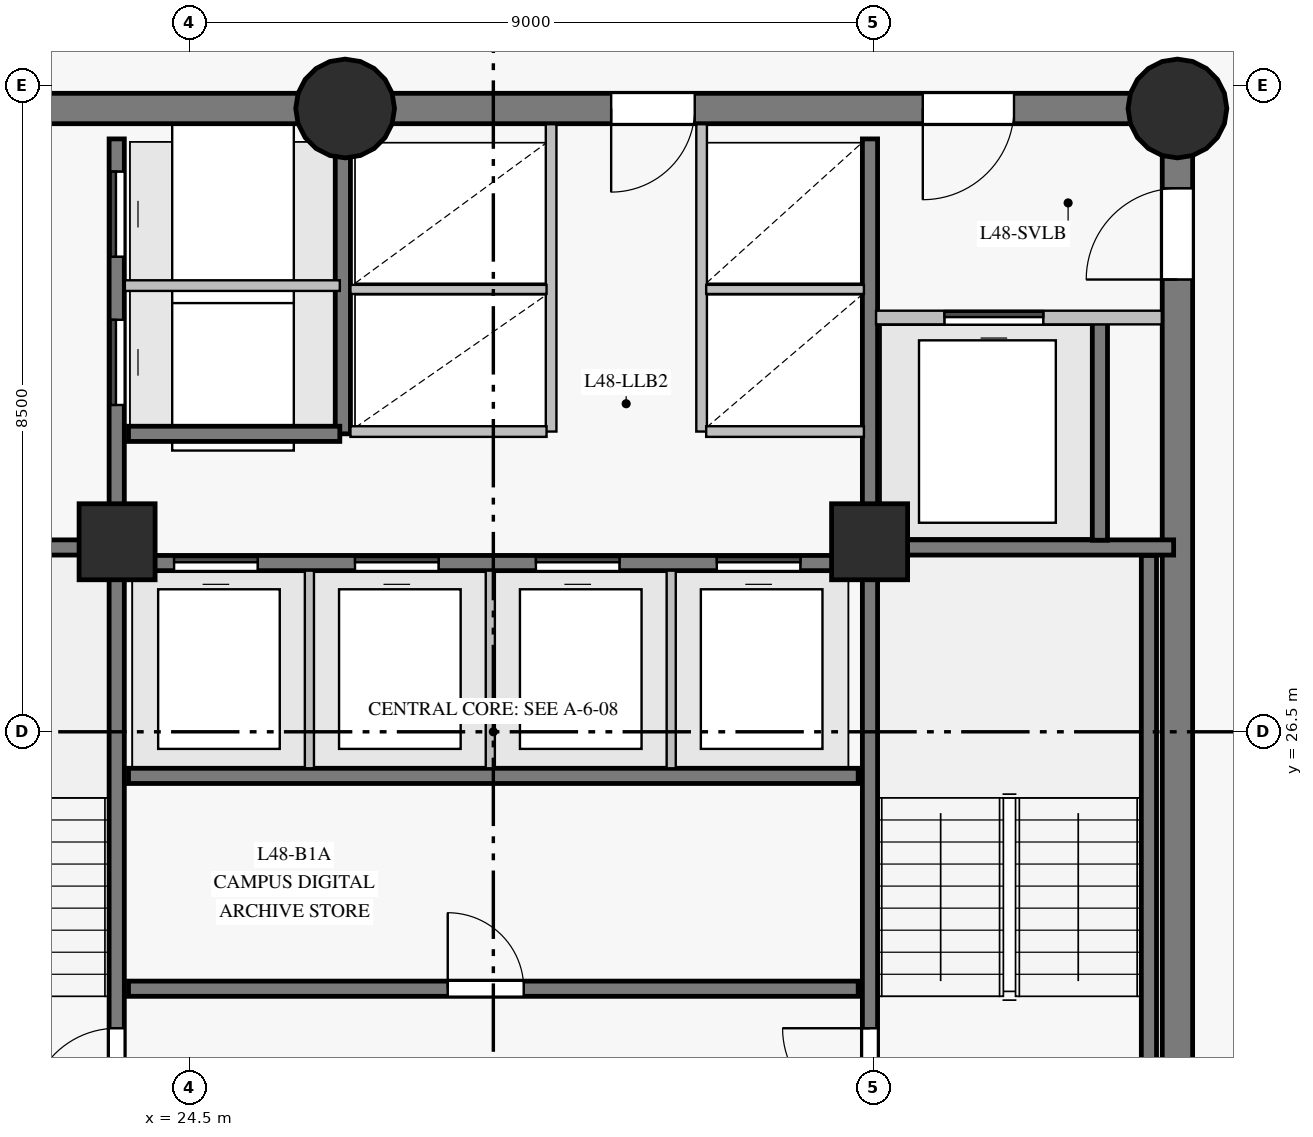
"""IFC4 building model, lengths in metres.
Left out: names, types, materials, properties, quantities, classifications, styles, units other than length and angle.
Written with IfcOpenShell. Run it as: python <this file> out.ifc"""

import sys

from ifc_helpers import new_model, si_unit, direction, frame, frame_2d, origin, origin_with_axes, origin_2d, place, context, subcontext, project, spatial, rectangle, circle, extrude, source, transform, mapped, element, fill, save


model = new_model("IFC4")
c1 = context("Model", 3, precision=1e-05, world=origin(), true_north=direction((0.0, 1.0)))
c2 = subcontext(c1, "Body", "Model", "MODEL_VIEW")
j1 = project(units=[si_unit("LENGTHUNIT", "METRE"), si_unit("PLANEANGLEUNIT", "RADIAN")], contexts=[c1])
p1 = place(None, origin())
s1 = spatial("IfcSite", under=j1, at=p1, CompositionType="ELEMENT")
p2 = place(p1, origin())
s2 = spatial("IfcBuilding", under=s1, at=p2, CompositionType="ELEMENT")
p3 = place(p2, frame((0.0, 0.0, 168.75)))
s3 = spatial("IfcBuildingStorey", under=s2, at=p3, CompositionType="ELEMENT", Elevation=168.75)
p4 = place(p3, frame((37.5, 18.3, 0.0), z_axis=(0.0, 0.0, 1.0), x_axis=(0.0, 1.0, 0.0)))
e1 = element("IfcWall", 1, at=p4, inside=s3, PredefinedType="SHEAR", context=c2, shape_type="SweptSolid", body=[
    extrude(rectangle(XDim=16.4, YDim=0.4, at=frame_2d((8.2, 0.0))), origin(), (0.0, 0.0, 1.0), 2.825),
])
p5 = place(p4, frame((14.15, 0.0, 0.0)))
e2 = element("IfcOpeningElement", 2, at=p5, cuts=e1, PredefinedType="OPENING", context=c2, shape_type="SweptSolid", body=[
    extrude(rectangle(XDim=1.2, YDim=2.15, at=frame_2d((0.6, 1.075))), frame((0.0, 0.21, 0.0), z_axis=(0.0, -1.0, 0.0), x_axis=(1.0, 0.0, 0.0)), (0.0, 0.0, 1.0), 0.42),
])
p6 = place(p3, frame((37.5, 34.7, 0.0), z_axis=(0.0, 0.0, 1.0), x_axis=(-1.0, 0.0, 0.0)))
e3 = element("IfcWall", 3, at=p6, inside=s3, PredefinedType="SHEAR", context=c2, shape_type="SweptSolid", body=[
    extrude(rectangle(XDim=10.95, YDim=0.4, at=frame_2d((5.475, 0.0))), origin(), (0.0, 0.0, 1.0), 2.825),
])
p7 = place(p6, frame((2.15, 0.0, 0.0)))
e4 = element("IfcOpeningElement", 4, at=p7, cuts=e3, PredefinedType="OPENING", context=c2, shape_type="SweptSolid", body=[
    extrude(rectangle(XDim=1.2, YDim=2.15, at=frame_2d((0.6, 1.075))), frame((0.0, 0.21, 0.0), z_axis=(0.0, -1.0, 0.0), x_axis=(1.0, 0.0, 0.0)), (0.0, 0.0, 1.0), 0.42),
])
p8 = place(p6, frame((6.35, 0.0, 0.0)))
e5 = element("IfcOpeningElement", 5, at=p8, cuts=e3, PredefinedType="OPENING", context=c2, shape_type="SweptSolid", body=[
    extrude(rectangle(XDim=1.1, YDim=2.15, at=frame_2d((0.55, 1.075))), frame((0.0, 0.21, 0.0), z_axis=(0.0, -1.0, 0.0), x_axis=(1.0, 0.0, 0.0)), (0.0, 0.0, 1.0), 0.42),
])
p9 = place(p3, frame((26.55, 34.7, 0.0), z_axis=(0.0, 0.0, 1.0), x_axis=(-1.0, 0.0, 0.0)))
e6 = element("IfcWall", 6, at=p9, inside=s3, PredefinedType="SHEAR", context=c2, shape_type="SweptSolid", body=[
    extrude(rectangle(XDim=7.05, YDim=0.4, at=frame_2d((3.525, 0.0))), origin(), (0.0, 0.0, 1.0), 2.825),
])
p10 = place(p9, frame((4.25, 0.0, 0.0)))
e7 = element("IfcOpeningElement", 7, at=p10, cuts=e6, PredefinedType="OPENING", context=c2, shape_type="SweptSolid", body=[
    extrude(rectangle(XDim=1.1, YDim=2.15, at=frame_2d((0.55, 1.075))), frame((0.0, 0.21, 0.0), z_axis=(0.0, -1.0, 0.0), x_axis=(1.0, 0.0, 0.0)), (0.0, 0.0, 1.0), 0.42),
])
m1 = source(origin_with_axes(), c2, "Body", "SweptSolid", [
    extrude(circle(Radius=0.65, at=origin_2d()), origin(), (0.0, 0.0, 1.0), 3.05),
])
for number, where, z_axis, x_axis in (
    (8, (26.55, 34.7, 0.0), (0.0, 0.0, 1.0), (1.0, 0.0, 0.0)),
    (9, (37.5, 34.7, 0.0), (0.0, 0.0, 1.0), (1.0, 0.0, 0.0)),
):
    element("IfcColumn", number, at=place(p3, frame(where, z_axis=z_axis, x_axis=x_axis)), inside=s3, PredefinedType="COLUMN", context=c2, shape_type="MappedRepresentation", body=[
        mapped(m1, transform((0.0, 0.0, 0.0), scale=1.0)),
    ])
m2 = source(origin_with_axes(), c2, "Body", "SweptSolid", [
    extrude(rectangle(XDim=1.0, YDim=1.0, at=origin_2d()), origin(), (0.0, 0.0, 1.0), 3.05),
])
for number, where, z_axis, x_axis in (
    (10, (23.55, 29.0, 0.0), (0.0, 0.0, 1.0), (1.0, 0.0, 0.0)),
    (11, (33.45, 29.0, 0.0), (0.0, 0.0, 1.0), (1.0, 0.0, 0.0)),
):
    element("IfcColumn", number, at=place(p3, frame(where, z_axis=z_axis, x_axis=x_axis)), inside=s3, PredefinedType="COLUMN", context=c2, shape_type="MappedRepresentation", body=[
        mapped(m2, transform((0.0, 0.0, 0.0), scale=1.0)),
    ])
p11 = place(p3, frame((23.545, 18.7, 0.0), z_axis=(0.0, 0.0, 1.0), x_axis=(0.0, 1.0, 0.0)))
e12 = element("IfcWall", 12, at=p11, inside=s3, PredefinedType="SHEAR", context=c2, shape_type="SweptSolid", body=[
    extrude(rectangle(XDim=15.6, YDim=0.2, at=frame_2d((7.8, 0.0))), origin(), (0.0, 0.0, 1.0), 2.825),
])
p12 = place(p11, frame((2.75, 0.0, 0.0)))
e13 = element("IfcOpeningElement", 13, at=p12, cuts=e12, PredefinedType="OPENING", context=c2, shape_type="SweptSolid", body=[
    extrude(rectangle(XDim=1.15, YDim=2.15, at=frame_2d((0.575, 1.075))), frame((0.0, 0.11, 0.0), z_axis=(0.0, -1.0, 0.0), x_axis=(1.0, 0.0, 0.0)), (0.0, 0.0, 1.0), 0.22),
])
p13 = place(p11, frame((0.14, 0.0, 0.0)))
e14 = element("IfcOpeningElement", 14, at=p13, cuts=e12, PredefinedType="OPENING", context=c2, shape_type="SweptSolid", body=[
    extrude(rectangle(XDim=0.88, YDim=2.1, at=frame_2d((0.44, 1.05))), frame((0.0, 0.11, 0.0), z_axis=(0.0, -1.0, 0.0), x_axis=(1.0, 0.0, 0.0)), (0.0, 0.0, 1.0), 0.22),
])
p14 = place(p11, frame((1.36, 0.0, 0.0)))
e15 = element("IfcOpeningElement", 15, at=p14, cuts=e12, PredefinedType="OPENING", context=c2, shape_type="SweptSolid", body=[
    extrude(rectangle(XDim=0.88, YDim=2.1, at=frame_2d((0.44, 1.05))), frame((0.0, 0.11, 0.0), z_axis=(0.0, -1.0, 0.0), x_axis=(1.0, 0.0, 0.0)), (0.0, 0.0, 1.0), 0.22),
])
p15 = place(p11, frame((12.1, 0.0, 0.0)))
e16 = element("IfcOpeningElement", 16, at=p15, cuts=e12, PredefinedType="OPENING", context=c2, shape_type="SweptSolid", body=[
    extrude(rectangle(XDim=1.12, YDim=2.15, at=frame_2d((0.56, 1.075))), frame((0.0, 0.11, 0.0), z_axis=(0.0, -1.0, 0.0), x_axis=(1.0, 0.0, 0.0)), (0.0, 0.0, 1.0), 0.22),
])
p16 = place(p11, frame((14.05, 0.0, 0.0)))
e17 = element("IfcOpeningElement", 17, at=p16, cuts=e12, PredefinedType="OPENING", context=c2, shape_type="SweptSolid", body=[
    extrude(rectangle(XDim=1.12, YDim=2.15, at=frame_2d((0.56, 1.075))), frame((0.0, 0.11, 0.0), z_axis=(0.0, -1.0, 0.0), x_axis=(1.0, 0.0, 0.0)), (0.0, 0.0, 1.0), 0.22),
])
p17 = place(p3, frame((33.455, 18.7, 0.0), z_axis=(0.0, 0.0, 1.0), x_axis=(0.0, 1.0, 0.0)))
e18 = element("IfcWall", 18, at=p17, inside=s3, PredefinedType="SHEAR", context=c2, shape_type="SweptSolid", body=[
    extrude(rectangle(XDim=15.6, YDim=0.2, at=frame_2d((7.8, 0.0))), origin(), (0.0, 0.0, 1.0), 2.825),
])
p18 = place(p17, frame((2.75, 0.0, 0.0)))
e19 = element("IfcOpeningElement", 19, at=p18, cuts=e18, PredefinedType="OPENING", context=c2, shape_type="SweptSolid", body=[
    extrude(rectangle(XDim=1.15, YDim=2.15, at=frame_2d((0.575, 1.075))), frame((0.0, 0.11, 0.0), z_axis=(0.0, -1.0, 0.0), x_axis=(1.0, 0.0, 0.0)), (0.0, 0.0, 1.0), 0.22),
])
p19 = place(p17, frame((0.55, 0.0, 0.0)))
e20 = element("IfcOpeningElement", 20, at=p19, cuts=e18, PredefinedType="OPENING", context=c2, shape_type="SweptSolid", body=[
    extrude(rectangle(XDim=0.94, YDim=2.1, at=frame_2d((0.47, 1.05))), frame((0.0, 0.11, 0.0), z_axis=(0.0, -1.0, 0.0), x_axis=(1.0, 0.0, 0.0)), (0.0, 0.0, 1.0), 0.22),
])
p20 = place(p3, frame((23.7, 23.12, 0.0), z_axis=(0.0, 0.0, 1.0), x_axis=(1.0, 0.0, 0.0)))
e21 = element("IfcWall", 21, at=p20, inside=s3, PredefinedType="SHEAR", context=c2, shape_type="SweptSolid", body=[
    extrude(rectangle(XDim=9.6, YDim=0.2, at=frame_2d((4.8, 0.0))), origin(), (0.0, 0.0, 1.0), 2.825),
])
p21 = place(p20, frame((4.2, 0.0, 0.0)))
e22 = element("IfcOpeningElement", 22, at=p21, cuts=e21, PredefinedType="OPENING", context=c2, shape_type="SweptSolid", body=[
    extrude(rectangle(XDim=1.0, YDim=2.15, at=frame_2d((0.5, 1.075))), frame((0.0, 0.11, 0.0), z_axis=(0.0, -1.0, 0.0), x_axis=(1.0, 0.0, 0.0)), (0.0, 0.0, 1.0), 0.22),
])
p22 = place(p3, frame((23.7, 25.92, 0.0), z_axis=(0.0, 0.0, 1.0), x_axis=(1.0, 0.0, 0.0)))
e23 = element("IfcWall", 23, at=p22, inside=s3, PredefinedType="SHEAR", context=c2, shape_type="SweptSolid", body=[
    extrude(rectangle(XDim=9.6, YDim=0.2, at=frame_2d((4.8, 0.0))), origin(), (0.0, 0.0, 1.0), 2.825),
])
p23 = place(p3, frame((23.7, 28.72, 0.0), z_axis=(0.0, 0.0, 1.0), x_axis=(1.0, 0.0, 0.0)))
e24 = element("IfcWall", 24, at=p23, inside=s3, PredefinedType="SHEAR", context=c2, shape_type="SweptSolid", body=[
    extrude(rectangle(XDim=9.6, YDim=0.2, at=frame_2d((4.8, 0.0))), origin(), (0.0, 0.0, 1.0), 2.825),
])
p24 = place(p23, frame((0.6, 0.0, 0.0)))
e25 = element("IfcOpeningElement", 25, at=p24, cuts=e24, PredefinedType="OPENING", context=c2, shape_type="SweptSolid", body=[
    extrude(rectangle(XDim=1.1, YDim=2.15, at=frame_2d((0.55, 1.075))), frame((0.0, 0.11, 0.0), z_axis=(0.0, -1.0, 0.0), x_axis=(1.0, 0.0, 0.0)), (0.0, 0.0, 1.0), 0.22),
])
p25 = place(p23, frame((2.98, 0.0, 0.0)))
e26 = element("IfcOpeningElement", 26, at=p25, cuts=e24, PredefinedType="OPENING", context=c2, shape_type="SweptSolid", body=[
    extrude(rectangle(XDim=1.1, YDim=2.15, at=frame_2d((0.55, 1.075))), frame((0.0, 0.11, 0.0), z_axis=(0.0, -1.0, 0.0), x_axis=(1.0, 0.0, 0.0)), (0.0, 0.0, 1.0), 0.22),
])
p26 = place(p23, frame((5.36, 0.0, 0.0)))
e27 = element("IfcOpeningElement", 27, at=p26, cuts=e24, PredefinedType="OPENING", context=c2, shape_type="SweptSolid", body=[
    extrude(rectangle(XDim=1.1, YDim=2.15, at=frame_2d((0.55, 1.075))), frame((0.0, 0.11, 0.0), z_axis=(0.0, -1.0, 0.0), x_axis=(1.0, 0.0, 0.0)), (0.0, 0.0, 1.0), 0.22),
])
p27 = place(p23, frame((7.74, 0.0, 0.0)))
e28 = element("IfcOpeningElement", 28, at=p27, cuts=e24, PredefinedType="OPENING", context=c2, shape_type="SweptSolid", body=[
    extrude(rectangle(XDim=1.1, YDim=2.15, at=frame_2d((0.55, 1.075))), frame((0.0, 0.11, 0.0), z_axis=(0.0, -1.0, 0.0), x_axis=(1.0, 0.0, 0.0)), (0.0, 0.0, 1.0), 0.22),
])
p28 = place(p3, frame((37.125, 21.32, 0.0), z_axis=(0.0, 0.0, 1.0), x_axis=(0.0, 1.0, 0.0)))
e29 = element("IfcWall", 29, at=p28, inside=s3, PredefinedType="SHEAR", context=c2, shape_type="SweptSolid", body=[
    extrude(rectangle(XDim=7.5, YDim=0.2, at=frame_2d((3.75, 0.0))), origin(), (0.0, 0.0, 1.0), 2.825),
])
for number, where, z_axis, x_axis in (
    (30, (33.455, 28.925, 0.0), (0.0, 0.0, 1.0), (1.0, 0.0, 0.0)),
    (31, (19.55, 28.925, 0.0), (0.0, 0.0, 1.0), (1.0, 0.0, 0.0)),
):
    element("IfcWall", number, at=place(p3, frame(where, z_axis=z_axis, x_axis=x_axis)), inside=s3, PredefinedType="SHEAR", context=c2, shape_type="SweptSolid", body=[
        extrude(rectangle(XDim=3.995, YDim=0.2, at=frame_2d((1.998, 0.0))), origin(), (0.0, 0.0, 1.0), 2.825),
    ])
p29 = place(p3, frame((26.52, 30.42, 0.0), z_axis=(0.0, 0.0, 1.0), x_axis=(0.0, 1.0, 0.0)))
e32 = element("IfcWall", 32, at=p29, inside=s3, PredefinedType="SHEAR", context=c2, shape_type="SweptSolid", body=[
    extrude(rectangle(XDim=3.86, YDim=0.2, at=frame_2d((1.93, 0.0))), origin(), (0.0, 0.0, 1.0), 2.825),
])
p30 = place(p3, frame((36.48, 29.02, 0.0), z_axis=(0.0, 0.0, 1.0), x_axis=(0.0, 1.0, 0.0)))
e33 = element("IfcWall", 33, at=p30, inside=s3, PredefinedType="SHEAR", context=c2, shape_type="SweptSolid", body=[
    extrude(rectangle(XDim=2.86, YDim=0.2, at=frame_2d((1.43, 0.0))), origin(), (0.0, 0.0, 1.0), 2.825),
])
p31 = place(p3, frame((23.7, 30.42, 0.0), z_axis=(0.0, 0.0, 1.0), x_axis=(1.0, 0.0, 0.0)))
e34 = element("IfcWall", 34, at=p31, inside=s3, PredefinedType="SHEAR", context=c2, shape_type="SweptSolid", body=[
    extrude(rectangle(XDim=2.78, YDim=0.2, at=frame_2d((1.39, 0.0))), origin(), (0.0, 0.0, 1.0), 2.825),
])
for number, where, z_axis, x_axis in (
    (35, (29.26, 30.45, 0.0), (0.0, 0.0, 1.0), (0.0, 1.0, 0.0)),
    (36, (31.24, 30.45, 0.0), (0.0, 0.0, 1.0), (0.0, 1.0, 0.0)),
):
    element("IfcWall", number, at=place(p3, frame(where, z_axis=z_axis, x_axis=x_axis)), inside=s3, PredefinedType="PARTITIONING", context=c2, shape_type="SweptSolid", body=[
        extrude(rectangle(XDim=4.043, YDim=0.14, at=frame_2d((2.021, 0.0))), origin(), (0.0, 0.0, 1.0), 2.825),
    ])
p32 = place(p3, frame((33.535, 31.95, 0.0), z_axis=(0.0, 0.0, 1.0), x_axis=(1.0, 0.0, 0.0)))
e37 = element("IfcWall", 37, at=p32, inside=s3, PredefinedType="PARTITIONING", context=c2, shape_type="SweptSolid", body=[
    extrude(rectangle(XDim=3.759, YDim=0.18, at=frame_2d((1.879, 0.0))), origin(), (0.0, 0.0, 1.0), 2.825),
])
p33 = place(p32, frame((0.9, 0.0, 0.0)))
e38 = element("IfcOpeningElement", 38, at=p33, cuts=e37, PredefinedType="OPENING", context=c2, shape_type="SweptSolid", body=[
    extrude(rectangle(XDim=1.3, YDim=2.2, at=frame_2d((0.65, 1.1))), frame((0.0, 0.1, 0.0), z_axis=(0.0, -1.0, 0.0), x_axis=(1.0, 0.0, 0.0)), (0.0, 0.0, 1.0), 0.2),
])
p34 = place(p3, frame((23.652, 32.37, 0.0), z_axis=(0.0, 0.0, 1.0), x_axis=(1.0, 0.0, 0.0)))
e39 = element("IfcWall", 39, at=p34, inside=s3, PredefinedType="PARTITIONING", context=c2, shape_type="SweptSolid", body=[
    extrude(rectangle(XDim=2.828, YDim=0.14, at=frame_2d((1.414, 0.0))), origin(), (0.0, 0.0, 1.0), 2.825),
])
for number, where, z_axis, x_axis in (
    (40, (26.08, 26.02, 0.0), (0.0, 0.0, 1.0), (0.0, 1.0, 0.0)),
    (41, (28.46, 26.02, 0.0), (0.0, 0.0, 1.0), (0.0, 1.0, 0.0)),
    (42, (30.84, 26.02, 0.0), (0.0, 0.0, 1.0), (0.0, 1.0, 0.0)),
):
    element("IfcWall", number, at=place(p3, frame(where, z_axis=z_axis, x_axis=x_axis)), inside=s3, PredefinedType="PARTITIONING", context=c2, shape_type="SweptSolid", body=[
        extrude(rectangle(XDim=2.6, YDim=0.12, at=frame_2d((1.3, 0.0))), origin(), (0.0, 0.0, 1.0), 2.825),
    ])
p35 = place(p3, frame((26.62, 30.45, 0.0), z_axis=(0.0, 0.0, 1.0), x_axis=(1.0, 0.0, 0.0)))
e43 = element("IfcWall", 43, at=p35, inside=s3, PredefinedType="PARTITIONING", context=c2, shape_type="SweptSolid", body=[
    extrude(rectangle(XDim=2.58, YDim=0.14, at=frame_2d((1.29, 0.0))), origin(), (0.0, 0.0, 1.0), 2.825),
])
p36 = place(p3, frame((26.62, 32.32, 0.0), z_axis=(0.0, 0.0, 1.0), x_axis=(1.0, 0.0, 0.0)))
e44 = element("IfcWall", 44, at=p36, inside=s3, PredefinedType="PARTITIONING", context=c2, shape_type="SweptSolid", body=[
    extrude(rectangle(XDim=2.58, YDim=0.12, at=frame_2d((1.29, 0.0))), origin(), (0.0, 0.0, 1.0), 2.825),
])
p37 = place(p3, frame((31.3, 30.45, 0.0), z_axis=(0.0, 0.0, 1.0), x_axis=(1.0, 0.0, 0.0)))
e45 = element("IfcWall", 45, at=p37, inside=s3, PredefinedType="PARTITIONING", context=c2, shape_type="SweptSolid", body=[
    extrude(rectangle(XDim=2.075, YDim=0.14, at=frame_2d((1.038, 0.0))), origin(), (0.0, 0.0, 1.0), 2.825),
])
p38 = place(p3, frame((31.3, 32.32, 0.0), z_axis=(0.0, 0.0, 1.0), x_axis=(1.0, 0.0, 0.0)))
e46 = element("IfcWall", 46, at=p38, inside=s3, PredefinedType="PARTITIONING", context=c2, shape_type="SweptSolid", body=[
    extrude(rectangle(XDim=2.075, YDim=0.12, at=frame_2d((1.038, 0.0))), origin(), (0.0, 0.0, 1.0), 2.825),
])
m3 = source(origin_with_axes(), c2, "Body", "SweptSolid", [
    extrude(rectangle(XDim=1.15, YDim=2.15, at=frame_2d((0.575, 1.075))), frame((0.0, 0.025, 0.0), z_axis=(0.0, -1.0, 0.0), x_axis=(1.0, 0.0, 0.0)), (0.0, 0.0, 1.0), 0.05),
])
p39 = place(p12, origin())
e47 = element("IfcDoor", 47, at=p39, inside=s3, OperationType="SINGLE_SWING_LEFT", PredefinedType="DOOR", context=c2, shape_type="MappedRepresentation", body=[
    mapped(m3, transform((0.0, 0.0, 0.0), scale=1.0)),
])
fill(e13, e47)
p40 = place(p18, origin())
e48 = element("IfcDoor", 48, at=p40, inside=s3, OperationType="SINGLE_SWING_RIGHT", PredefinedType="DOOR", context=c2, shape_type="MappedRepresentation", body=[
    mapped(m3, transform((0.0, 0.0, 0.0), scale=1.0)),
])
fill(e19, e48)
m4 = source(origin_with_axes(), c2, "Body", "SweptSolid", [
    extrude(rectangle(XDim=1.2, YDim=2.15, at=frame_2d((0.6, 1.075))), frame((0.0, 0.025, 0.0), z_axis=(0.0, -1.0, 0.0), x_axis=(1.0, 0.0, 0.0)), (0.0, 0.0, 1.0), 0.05),
])
p41 = place(p5, origin())
e49 = element("IfcDoor", 49, at=p41, inside=s3, OperationType="SINGLE_SWING_LEFT", PredefinedType="DOOR", context=c2, shape_type="MappedRepresentation", body=[
    mapped(m4, transform((0.0, 0.0, 0.0), scale=1.0)),
])
fill(e2, e49)
p42 = place(p7, origin())
e50 = element("IfcDoor", 50, at=p42, inside=s3, OperationType="SINGLE_SWING_RIGHT", PredefinedType="DOOR", context=c2, shape_type="MappedRepresentation", body=[
    mapped(m4, transform((0.0, 0.0, 0.0), scale=1.0)),
])
fill(e4, e50)
m5 = source(origin_with_axes(), c2, "Body", "SweptSolid", [
    extrude(rectangle(XDim=1.3, YDim=2.2, at=frame_2d((0.65, 1.1))), frame((0.0, 0.025, 0.0), z_axis=(0.0, -1.0, 0.0), x_axis=(1.0, 0.0, 0.0)), (0.0, 0.0, 1.0), 0.05),
])
p43 = place(p33, origin())
e51 = element("IfcDoor", 51, at=p43, inside=s3, OperationType="SLIDING_TO_LEFT", PredefinedType="DOOR", context=c2, shape_type="MappedRepresentation", body=[
    mapped(m5, transform((0.0, 0.0, 0.0), scale=1.0)),
])
fill(e38, e51)
m6 = source(origin_with_axes(), c2, "Body", "SweptSolid", [
    extrude(rectangle(XDim=1.0, YDim=2.15, at=frame_2d((0.5, 1.075))), frame((0.0, 0.025, 0.0), z_axis=(0.0, -1.0, 0.0), x_axis=(1.0, 0.0, 0.0)), (0.0, 0.0, 1.0), 0.05),
])
p44 = place(p21, origin())
e52 = element("IfcDoor", 52, at=p44, inside=s3, OperationType="SINGLE_SWING_LEFT", PredefinedType="DOOR", context=c2, shape_type="MappedRepresentation", body=[
    mapped(m6, transform((0.0, 0.0, 0.0), scale=1.0)),
])
fill(e22, e52)
m7 = source(origin_with_axes(), c2, "Body", "SweptSolid", [
    extrude(rectangle(XDim=1.1, YDim=2.15, at=frame_2d((0.55, 1.075))), frame((0.0, 0.025, 0.0), z_axis=(0.0, -1.0, 0.0), x_axis=(1.0, 0.0, 0.0)), (0.0, 0.0, 1.0), 0.05),
])
p45 = place(p24, origin())
e53 = element("IfcDoor", 53, at=p45, inside=s3, OperationType="SLIDING_TO_LEFT", PredefinedType="DOOR", context=c2, shape_type="MappedRepresentation", body=[
    mapped(m7, transform((0.0, 0.0, 0.0), scale=1.0)),
])
fill(e25, e53)
p46 = place(p25, origin())
e54 = element("IfcDoor", 54, at=p46, inside=s3, OperationType="SLIDING_TO_RIGHT", PredefinedType="DOOR", context=c2, shape_type="MappedRepresentation", body=[
    mapped(m7, transform((0.0, 0.0, 0.0), scale=1.0)),
])
fill(e26, e54)
p47 = place(p26, origin())
e55 = element("IfcDoor", 55, at=p47, inside=s3, OperationType="SLIDING_TO_LEFT", PredefinedType="DOOR", context=c2, shape_type="MappedRepresentation", body=[
    mapped(m7, transform((0.0, 0.0, 0.0), scale=1.0)),
])
fill(e27, e55)
p48 = place(p27, origin())
e56 = element("IfcDoor", 56, at=p48, inside=s3, OperationType="SLIDING_TO_RIGHT", PredefinedType="DOOR", context=c2, shape_type="MappedRepresentation", body=[
    mapped(m7, transform((0.0, 0.0, 0.0), scale=1.0)),
])
fill(e28, e56)
p49 = place(p8, origin())
e57 = element("IfcDoor", 57, at=p49, inside=s3, OperationType="SINGLE_SWING_RIGHT", PredefinedType="DOOR", context=c2, shape_type="MappedRepresentation", body=[
    mapped(m7, transform((0.0, 0.0, 0.0), scale=1.0)),
])
fill(e5, e57)
m8 = source(origin_with_axes(), c2, "Body", "SweptSolid", [
    extrude(rectangle(XDim=1.12, YDim=2.15, at=frame_2d((0.56, 1.075))), frame((0.0, 0.025, 0.0), z_axis=(0.0, -1.0, 0.0), x_axis=(1.0, 0.0, 0.0)), (0.0, 0.0, 1.0), 0.05),
])
p50 = place(p15, origin())
e58 = element("IfcDoor", 58, at=p50, inside=s3, OperationType="SLIDING_TO_LEFT", PredefinedType="DOOR", context=c2, shape_type="MappedRepresentation", body=[
    mapped(m8, transform((0.0, 0.0, 0.0), scale=1.0)),
])
fill(e16, e58)
p51 = place(p16, origin())
e59 = element("IfcDoor", 59, at=p51, inside=s3, OperationType="SLIDING_TO_RIGHT", PredefinedType="DOOR", context=c2, shape_type="MappedRepresentation", body=[
    mapped(m8, transform((0.0, 0.0, 0.0), scale=1.0)),
])
fill(e17, e59)
save(model, sys.argv[1])
